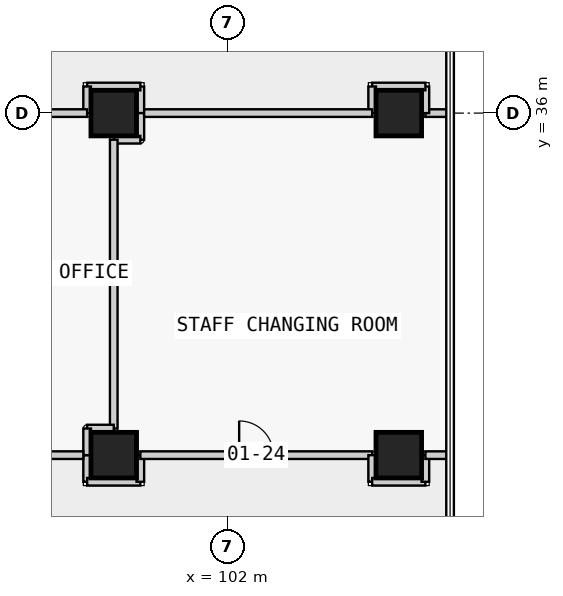
"""IFC4 building model, lengths in metres.
Left out: names, types, materials, properties, quantities, classifications, styles, units other than length and angle.
Written with IfcOpenShell. Run it as: python <this file> out.ifc"""

import sys

from ifc_helpers import new_model, si_unit, direction, frame, frame_2d, origin, origin_2d, place, context, subcontext, project, spatial, rectangle, extrude, element, fill, save


model = new_model("IFC4")
c1 = context("Model", 3, precision=1e-05, world=origin(), true_north=direction((0.0, 1.0)))
c2 = subcontext(c1, "Body", "Model", "MODEL_VIEW")
j1 = project(units=[si_unit("LENGTHUNIT", "METRE"), si_unit("PLANEANGLEUNIT", "RADIAN")], contexts=[c1])
p1 = place(None, origin())
s1 = spatial("IfcSite", under=j1, at=p1, CompositionType="ELEMENT")
p2 = place(p1, origin())
s2 = spatial("IfcBuilding", under=s1, at=p2, CompositionType="ELEMENT")
p3 = place(p2, frame((0.0, 0.0, 8.0)))
s3 = spatial("IfcBuildingStorey", under=s2, at=p3, CompositionType="ELEMENT", Elevation=8.0)
for number, where, z_axis, x_axis in (
    (1, (99.0, 27.0, 0.0), (0.0, 0.0, 1.0), (1.0, 0.0, 0.0)),
    (2, (99.0, 36.0, 0.0), (0.0, 0.0, 1.0), (1.0, 0.0, 0.0)),
    (3, (106.5, 27.0, 0.0), (0.0, 0.0, 1.0), (1.0, 0.0, 0.0)),
    (4, (106.5, 36.0, 0.0), (0.0, 0.0, 1.0), (1.0, 0.0, 0.0)),
):
    element("IfcColumn", number, at=place(p3, frame(where, z_axis=z_axis, x_axis=x_axis)), inside=s3, PredefinedType="COLUMN", context=c2, shape_type="SweptSolid", body=[
        extrude(rectangle(XDim=1.2, YDim=1.2, at=origin_2d()), origin(), (0.0, 0.0, 1.0), 4.8),
    ])
p4 = place(p3, frame((98.3, 27.0, 0.0), z_axis=(0.0, 0.0, 1.0), x_axis=(0.0, -1.0, 0.0)))
e5 = element("IfcWall", 5, at=p4, inside=s3, PredefinedType="PARTITIONING", context=c2, shape_type="SweptSolid", body=[
    extrude(rectangle(XDim=0.7, YDim=0.2, at=frame_2d((0.35, 0.0))), origin(), (0.0, 0.0, 1.0), 3.75),
])
p5 = place(p3, frame((98.3, 26.3, 0.0), z_axis=(0.0, 0.0, 1.0), x_axis=(1.0, 0.0, 0.0)))
e6 = element("IfcWall", 6, at=p5, inside=s3, PredefinedType="PARTITIONING", context=c2, shape_type="SweptSolid", body=[
    extrude(rectangle(XDim=1.4, YDim=0.2, at=frame_2d((0.7, 0.0))), origin(), (0.0, 0.0, 1.0), 4.45),
])
p6 = place(p3, frame((99.7, 26.3, 0.0), z_axis=(0.0, 0.0, 1.0), x_axis=(0.0, 1.0, 0.0)))
e7 = element("IfcWall", 7, at=p6, inside=s3, PredefinedType="PARTITIONING", context=c2, shape_type="SweptSolid", body=[
    extrude(rectangle(XDim=0.7, YDim=0.2, at=frame_2d((0.35, 0.0))), origin(), (0.0, 0.0, 1.0), 3.75),
])
p7 = place(p3, frame((99.7, 27.0, 0.0), z_axis=(0.0, 0.0, 1.0), x_axis=(1.0, 0.0, 0.0)))
e8 = element("IfcWall", 8, at=p7, inside=s3, PredefinedType="PARTITIONING", context=c2, shape_type="SweptSolid", body=[
    extrude(rectangle(XDim=6.1, YDim=0.2, at=frame_2d((3.05, 0.0))), origin(), (0.0, 0.0, 1.0), 3.75),
])
p8 = place(p7, frame((2.6, 0.0, 0.0)))
e9 = element("IfcOpeningElement", 9, at=p8, cuts=e8, PredefinedType="OPENING", context=c2, shape_type="SweptSolid", body=[
    extrude(rectangle(XDim=0.9, YDim=2.1, at=frame_2d((0.45, 1.05))), frame((0.0, 0.11, 0.0), z_axis=(0.0, -1.0, 0.0), x_axis=(1.0, 0.0, 0.0)), (0.0, 0.0, 1.0), 0.22),
])
p9 = place(p3, frame((105.8, 27.0, 0.0), z_axis=(0.0, 0.0, 1.0), x_axis=(0.0, -1.0, 0.0)))
e10 = element("IfcWall", 10, at=p9, inside=s3, PredefinedType="PARTITIONING", context=c2, shape_type="SweptSolid", body=[
    extrude(rectangle(XDim=0.7, YDim=0.2, at=frame_2d((0.35, 0.0))), origin(), (0.0, 0.0, 1.0), 3.75),
])
p10 = place(p3, frame((105.8, 26.3, 0.0), z_axis=(0.0, 0.0, 1.0), x_axis=(1.0, 0.0, 0.0)))
e11 = element("IfcWall", 11, at=p10, inside=s3, PredefinedType="PARTITIONING", context=c2, shape_type="SweptSolid", body=[
    extrude(rectangle(XDim=1.4, YDim=0.2, at=frame_2d((0.7, 0.0))), origin(), (0.0, 0.0, 1.0), 3.75),
])
p11 = place(p3, frame((107.2, 26.3, 0.0), z_axis=(0.0, 0.0, 1.0), x_axis=(0.0, 1.0, 0.0)))
e12 = element("IfcWall", 12, at=p11, inside=s3, PredefinedType="PARTITIONING", context=c2, shape_type="SweptSolid", body=[
    extrude(rectangle(XDim=0.7, YDim=0.2, at=frame_2d((0.35, 0.0))), origin(), (0.0, 0.0, 1.0), 4.45),
])
p12 = place(p3, frame((107.2, 27.0, 0.0), z_axis=(0.0, 0.0, 1.0), x_axis=(1.0, 0.0, 0.0)))
e13 = element("IfcWall", 13, at=p12, inside=s3, PredefinedType="PARTITIONING", context=c2, shape_type="SweptSolid", body=[
    extrude(rectangle(XDim=0.65, YDim=0.2, at=frame_2d((0.325, 0.0))), origin(), (0.0, 0.0, 1.0), 4.45),
])
p13 = place(p3, frame((99.7, 36.0, 0.0), z_axis=(0.0, 0.0, 1.0), x_axis=(0.0, 1.0, 0.0)))
e14 = element("IfcWall", 14, at=p13, inside=s3, PredefinedType="PARTITIONING", context=c2, shape_type="SweptSolid", body=[
    extrude(rectangle(XDim=0.7, YDim=0.2, at=frame_2d((0.35, 0.0))), origin(), (0.0, 0.0, 1.0), 3.75),
])
p14 = place(p3, frame((99.7, 36.7, 0.0), z_axis=(0.0, 0.0, 1.0), x_axis=(-1.0, 0.0, 0.0)))
e15 = element("IfcWall", 15, at=p14, inside=s3, PredefinedType="PARTITIONING", context=c2, shape_type="SweptSolid", body=[
    extrude(rectangle(XDim=1.4, YDim=0.2, at=frame_2d((0.7, 0.0))), origin(), (0.0, 0.0, 1.0), 3.75),
])
p15 = place(p3, frame((98.3, 36.7, 0.0), z_axis=(0.0, 0.0, 1.0), x_axis=(0.0, -1.0, 0.0)))
e16 = element("IfcWall", 16, at=p15, inside=s3, PredefinedType="PARTITIONING", context=c2, shape_type="SweptSolid", body=[
    extrude(rectangle(XDim=0.7, YDim=0.2, at=frame_2d((0.35, 0.0))), origin(), (0.0, 0.0, 1.0), 3.75),
])
p16 = place(p3, frame((98.3, 36.0, 0.0), z_axis=(0.0, 0.0, 1.0), x_axis=(-1.0, 0.0, 0.0)))
e17 = element("IfcWall", 17, at=p16, inside=s3, PredefinedType="PARTITIONING", context=c2, shape_type="SweptSolid", body=[
    extrude(rectangle(XDim=7.6, YDim=0.2, at=frame_2d((3.8, 0.0))), origin(), (0.0, 0.0, 1.0), 3.75),
])
p17 = place(p16, frame((3.35, 0.0, 0.0)))
e18 = element("IfcOpeningElement", 18, at=p17, cuts=e17, PredefinedType="OPENING", context=c2, shape_type="SweptSolid", body=[
    extrude(rectangle(XDim=0.9, YDim=2.1, at=frame_2d((0.45, 1.05))), frame((0.0, 0.11, 0.0), z_axis=(0.0, -1.0, 0.0), x_axis=(1.0, 0.0, 0.0)), (0.0, 0.0, 1.0), 0.22),
])
for number, where, z_axis, x_axis in (
    (19, (99.7, 36.0, 0.0), (0.0, 0.0, 1.0), (0.0, -1.0, 0.0)),
    (20, (99.7, 35.3, 0.0), (0.0, 0.0, 1.0), (-1.0, 0.0, 0.0)),
):
    element("IfcWall", number, at=place(p3, frame(where, z_axis=z_axis, x_axis=x_axis)), inside=s3, PredefinedType="PARTITIONING", context=c2, shape_type="SweptSolid", body=[
        extrude(rectangle(XDim=0.7, YDim=0.2, at=frame_2d((0.35, 0.0))), origin(), (0.0, 0.0, 1.0), 3.75),
    ])
p18 = place(p3, frame((99.0, 35.3, 0.0), z_axis=(0.0, 0.0, 1.0), x_axis=(0.0, -1.0, 0.0)))
e21 = element("IfcWall", 21, at=p18, inside=s3, PredefinedType="PARTITIONING", context=c2, shape_type="SweptSolid", body=[
    extrude(rectangle(XDim=7.6, YDim=0.2, at=frame_2d((3.8, 0.0))), origin(), (0.0, 0.0, 1.0), 3.75),
])
for number, where, z_axis, x_axis in (
    (22, (99.0, 27.7, 0.0), (0.0, 0.0, 1.0), (-1.0, 0.0, 0.0)),
    (23, (98.3, 27.7, 0.0), (0.0, 0.0, 1.0), (0.0, -1.0, 0.0)),
):
    element("IfcWall", number, at=place(p3, frame(where, z_axis=z_axis, x_axis=x_axis)), inside=s3, PredefinedType="PARTITIONING", context=c2, shape_type="SweptSolid", body=[
        extrude(rectangle(XDim=0.7, YDim=0.2, at=frame_2d((0.35, 0.0))), origin(), (0.0, 0.0, 1.0), 3.75),
    ])
p19 = place(p3, frame((107.85, 36.0, 0.0), z_axis=(0.0, 0.0, 1.0), x_axis=(-1.0, 0.0, 0.0)))
e24 = element("IfcWall", 24, at=p19, inside=s3, PredefinedType="PARTITIONING", context=c2, shape_type="SweptSolid", body=[
    extrude(rectangle(XDim=0.65, YDim=0.2, at=frame_2d((0.325, 0.0))), origin(), (0.0, 0.0, 1.0), 4.45),
])
p20 = place(p3, frame((107.2, 36.0, 0.0), z_axis=(0.0, 0.0, 1.0), x_axis=(0.0, 1.0, 0.0)))
e25 = element("IfcWall", 25, at=p20, inside=s3, PredefinedType="PARTITIONING", context=c2, shape_type="SweptSolid", body=[
    extrude(rectangle(XDim=0.7, YDim=0.2, at=frame_2d((0.35, 0.0))), origin(), (0.0, 0.0, 1.0), 4.45),
])
p21 = place(p3, frame((107.2, 36.7, 0.0), z_axis=(0.0, 0.0, 1.0), x_axis=(-1.0, 0.0, 0.0)))
e26 = element("IfcWall", 26, at=p21, inside=s3, PredefinedType="PARTITIONING", context=c2, shape_type="SweptSolid", body=[
    extrude(rectangle(XDim=1.4, YDim=0.2, at=frame_2d((0.7, 0.0))), origin(), (0.0, 0.0, 1.0), 3.75),
])
p22 = place(p3, frame((105.8, 36.7, 0.0), z_axis=(0.0, 0.0, 1.0), x_axis=(0.0, -1.0, 0.0)))
e27 = element("IfcWall", 27, at=p22, inside=s3, PredefinedType="PARTITIONING", context=c2, shape_type="SweptSolid", body=[
    extrude(rectangle(XDim=0.7, YDim=0.2, at=frame_2d((0.35, 0.0))), origin(), (0.0, 0.0, 1.0), 3.75),
])
p23 = place(p3, frame((105.8, 36.0, 0.0), z_axis=(0.0, 0.0, 1.0), x_axis=(-1.0, 0.0, 0.0)))
e28 = element("IfcWall", 28, at=p23, inside=s3, PredefinedType="PARTITIONING", context=c2, shape_type="SweptSolid", body=[
    extrude(rectangle(XDim=6.0, YDim=0.2, at=frame_2d((3.0, 0.0))), origin(), (0.0, 0.0, 1.0), 3.75),
])
p24 = place(p3, frame((90.7, 27.0, 0.0), z_axis=(0.0, 0.0, 1.0), x_axis=(1.0, 0.0, 0.0)))
e29 = element("IfcWall", 29, at=p24, inside=s3, PredefinedType="PARTITIONING", context=c2, shape_type="SweptSolid", body=[
    extrude(rectangle(XDim=7.5, YDim=0.2, at=frame_2d((3.75, 0.0))), origin(), (0.0, 0.0, 1.0), 3.75),
])
p25 = place(p8, origin())
e30 = element("IfcDoor", 30, at=p25, inside=s3, OperationType="SINGLE_SWING_LEFT", PredefinedType="DOOR", context=c2, shape_type="SweptSolid", body=[
    extrude(rectangle(XDim=0.9, YDim=2.1, at=frame_2d((0.45, 1.05))), frame((0.0, 0.025, 0.0), z_axis=(0.0, -1.0, 0.0), x_axis=(1.0, 0.0, 0.0)), (0.0, 0.0, 1.0), 0.05),
])
fill(e9, e30)
save(model, sys.argv[1])
